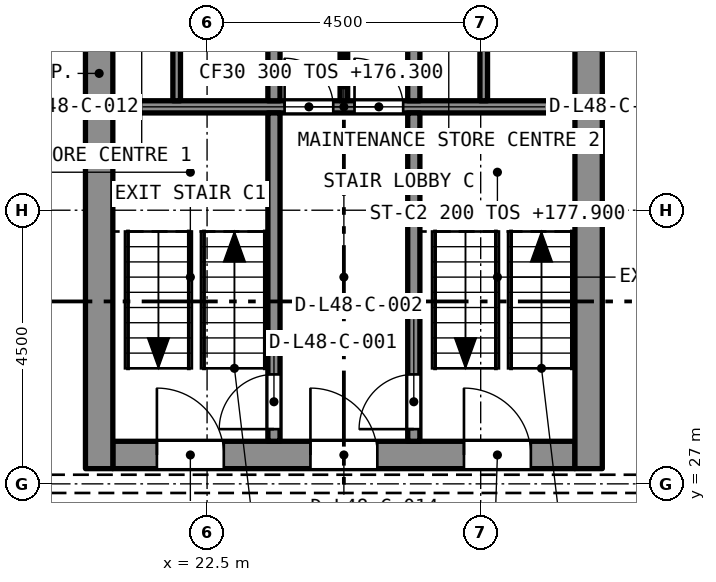
"""IFC4 building model, lengths in metres.
Left out: names, types, materials, properties, quantities, classifications, styles, units other than length and angle.
Written with IfcOpenShell. Run it as: python <this file> out.ifc"""

import sys

from ifc_helpers import new_model, si_unit, direction, frame, frame_2d, origin, place, context, subcontext, project, spatial, rectangle, extrude, element, fill, save


model = new_model("IFC4")
c1 = context("Model", 3, precision=1e-05, world=origin(), true_north=direction((0.0, 1.0)))
c2 = subcontext(c1, "Body", "Model", "MODEL_VIEW")
j1 = project(units=[si_unit("LENGTHUNIT", "METRE"), si_unit("PLANEANGLEUNIT", "RADIAN")], contexts=[c1])
p1 = place(None, origin())
s1 = spatial("IfcSite", under=j1, at=p1, CompositionType="ELEMENT")
p2 = place(p1, origin())
s2 = spatial("IfcBuilding", under=s1, at=p2, CompositionType="ELEMENT")
p3 = place(p2, frame((0.0, 0.0, 176.3)))
s3 = spatial("IfcBuildingStorey", under=s2, at=p3, CompositionType="ELEMENT", Elevation=176.3)
p4 = place(p3, frame((20.95, 27.475, 0.0), z_axis=(0.0, 0.0, 1.0), x_axis=(1.0, 0.0, 0.0)))
e1 = element("IfcWall", 1, at=p4, inside=s3, PredefinedType="SOLIDWALL", context=c2, shape_type="SweptSolid", body=[
    extrude(rectangle(XDim=7.6, YDim=0.45, at=frame_2d((3.8, 0.0))), origin(), (0.0, 0.0, 1.0), 3.2),
])
p5 = place(p4, frame((0.725, 0.0, 0.0)))
e2 = element("IfcOpeningElement", 2, at=p5, cuts=e1, PredefinedType="OPENING", context=c2, shape_type="SweptSolid", body=[
    extrude(rectangle(XDim=1.1, YDim=2.1, at=frame_2d((0.55, 1.05))), frame((0.0, 0.235, 0.0), z_axis=(0.0, -1.0, 0.0), x_axis=(1.0, 0.0, 0.0)), (0.0, 0.0, 1.0), 0.47),
])
p6 = place(p4, frame((3.25, 0.0, 0.0)))
e3 = element("IfcOpeningElement", 3, at=p6, cuts=e1, PredefinedType="OPENING", context=c2, shape_type="SweptSolid", body=[
    extrude(rectangle(XDim=1.1, YDim=2.1, at=frame_2d((0.55, 1.05))), frame((0.0, 0.235, 0.0), z_axis=(0.0, -1.0, 0.0), x_axis=(1.0, 0.0, 0.0)), (0.0, 0.0, 1.0), 0.47),
])
p7 = place(p4, frame((5.775, 0.0, 0.0)))
e4 = element("IfcOpeningElement", 4, at=p7, cuts=e1, PredefinedType="OPENING", context=c2, shape_type="SweptSolid", body=[
    extrude(rectangle(XDim=1.1, YDim=2.1, at=frame_2d((0.55, 1.05))), frame((0.0, 0.235, 0.0), z_axis=(0.0, -1.0, 0.0), x_axis=(1.0, 0.0, 0.0)), (0.0, 0.0, 1.0), 0.47),
])
p8 = place(p3, frame((20.725, 27.25, 0.0), z_axis=(0.0, 0.0, 1.0), x_axis=(0.0, 1.0, 0.0)))
e5 = element("IfcWall", 5, at=p8, inside=s3, PredefinedType="SOLIDWALL", context=c2, shape_type="SweptSolid", body=[
    extrude(rectangle(XDim=13.0, YDim=0.45, at=frame_2d((6.5, 0.0))), origin(), (0.0, 0.0, 1.0), 3.2),
])
p9 = place(p8, frame((8.7, 0.0, 0.0)))
e6 = element("IfcOpeningElement", 6, at=p9, cuts=e5, PredefinedType="OPENING", context=c2, shape_type="SweptSolid", body=[
    extrude(rectangle(XDim=1.2, YDim=2.1, at=frame_2d((0.6, 1.05))), frame((0.0, 0.235, 0.0), z_axis=(0.0, -1.0, 0.0), x_axis=(1.0, 0.0, 0.0)), (0.0, 0.0, 1.0), 0.47),
])
p10 = place(p3, frame((28.775, 27.25, 0.0), z_axis=(0.0, 0.0, 1.0), x_axis=(0.0, 1.0, 0.0)))
e7 = element("IfcWall", 7, at=p10, inside=s3, PredefinedType="SOLIDWALL", context=c2, shape_type="SweptSolid", body=[
    extrude(rectangle(XDim=13.0, YDim=0.45, at=frame_2d((6.5, 0.0))), origin(), (0.0, 0.0, 1.0), 3.2),
])
p11 = place(p10, frame((8.7, 0.0, 0.0)))
e8 = element("IfcOpeningElement", 8, at=p11, cuts=e7, PredefinedType="OPENING", context=c2, shape_type="SweptSolid", body=[
    extrude(rectangle(XDim=1.2, YDim=2.1, at=frame_2d((0.6, 1.05))), frame((0.0, 0.235, 0.0), z_axis=(0.0, -1.0, 0.0), x_axis=(1.0, 0.0, 0.0)), (0.0, 0.0, 1.0), 0.47),
])
p12 = place(p3, frame((20.95, 33.2, 0.0), z_axis=(0.0, 0.0, 1.0), x_axis=(1.0, 0.0, 0.0)))
e9 = element("IfcWall", 9, at=p12, inside=s3, PredefinedType="SOLIDWALL", context=c2, shape_type="SweptSolid", body=[
    extrude(rectangle(XDim=7.6, YDim=0.2, at=frame_2d((3.8, 0.0))), origin(), (0.0, 0.0, 1.0), 2.9),
])
p13 = place(p12, frame((2.825, 0.0, 0.0)))
e10 = element("IfcOpeningElement", 10, at=p13, cuts=e9, PredefinedType="OPENING", context=c2, shape_type="SweptSolid", body=[
    extrude(rectangle(XDim=0.8, YDim=2.1, at=frame_2d((0.4, 1.05))), frame((0.0, 0.11, 0.0), z_axis=(0.0, -1.0, 0.0), x_axis=(1.0, 0.0, 0.0)), (0.0, 0.0, 1.0), 0.22),
])
p14 = place(p12, frame((3.975, 0.0, 0.0)))
e11 = element("IfcOpeningElement", 11, at=p14, cuts=e9, PredefinedType="OPENING", context=c2, shape_type="SweptSolid", body=[
    extrude(rectangle(XDim=0.8, YDim=2.1, at=frame_2d((0.4, 1.05))), frame((0.0, 0.11, 0.0), z_axis=(0.0, -1.0, 0.0), x_axis=(1.0, 0.0, 0.0)), (0.0, 0.0, 1.0), 0.22),
])
p15 = place(p3, frame((23.6, 27.7, 0.0), z_axis=(0.0, 0.0, 1.0), x_axis=(0.0, 1.0, 0.0)))
e12 = element("IfcWall", 12, at=p15, inside=s3, PredefinedType="SOLIDWALL", context=c2, shape_type="SweptSolid", body=[
    extrude(rectangle(XDim=5.4, YDim=0.2, at=frame_2d((2.7, 0.0))), origin(), (0.0, 0.0, 1.0), 2.9),
])
p16 = place(p15, frame((0.2, 0.0, 0.0)))
e13 = element("IfcOpeningElement", 13, at=p16, cuts=e12, PredefinedType="OPENING", context=c2, shape_type="SweptSolid", body=[
    extrude(rectangle(XDim=0.9, YDim=2.1, at=frame_2d((0.45, 1.05))), frame((0.0, 0.11, 0.0), z_axis=(0.0, -1.0, 0.0), x_axis=(1.0, 0.0, 0.0)), (0.0, 0.0, 1.0), 0.22),
])
p17 = place(p3, frame((25.9, 27.7, 0.0), z_axis=(0.0, 0.0, 1.0), x_axis=(0.0, 1.0, 0.0)))
e14 = element("IfcWall", 14, at=p17, inside=s3, PredefinedType="SOLIDWALL", context=c2, shape_type="SweptSolid", body=[
    extrude(rectangle(XDim=5.4, YDim=0.2, at=frame_2d((2.7, 0.0))), origin(), (0.0, 0.0, 1.0), 2.9),
])
p18 = place(p17, frame((0.2, 0.0, 0.0)))
e15 = element("IfcOpeningElement", 15, at=p18, cuts=e14, PredefinedType="OPENING", context=c2, shape_type="SweptSolid", body=[
    extrude(rectangle(XDim=0.9, YDim=2.1, at=frame_2d((0.45, 1.05))), frame((0.0, 0.11, 0.0), z_axis=(0.0, -1.0, 0.0), x_axis=(1.0, 0.0, 0.0)), (0.0, 0.0, 1.0), 0.22),
])
for number, where, z_axis, x_axis in (
    (16, (23.6, 33.3, 0.0), (0.0, 0.0, 1.0), (0.0, 1.0, 0.0)),
    (17, (25.9, 33.3, 0.0), (0.0, 0.0, 1.0), (0.0, 1.0, 0.0)),
):
    element("IfcWall", number, at=place(p3, frame(where, z_axis=z_axis, x_axis=x_axis)), inside=s3, PredefinedType="SOLIDWALL", context=c2, shape_type="SweptSolid", body=[
        extrude(rectangle(XDim=2.3, YDim=0.2, at=frame_2d((1.15, 0.0))), origin(), (0.0, 0.0, 1.0), 2.9),
    ])
for number, where, z_axis, x_axis in (
    (18, (22.0, 33.3, 0.0), (0.0, 0.0, 1.0), (0.0, 1.0, 0.0)),
    (19, (27.05, 33.3, 0.0), (0.0, 0.0, 1.0), (0.0, 1.0, 0.0)),
    (20, (24.75, 33.3, 0.0), (0.0, 0.0, 1.0), (0.0, 1.0, 0.0)),
):
    element("IfcWall", number, at=place(p3, frame(where, z_axis=z_axis, x_axis=x_axis)), inside=s3, PredefinedType="PARTITIONING", context=c2, shape_type="SweptSolid", body=[
        extrude(rectangle(XDim=2.3, YDim=0.125, at=frame_2d((1.15, 0.0))), origin(), (0.0, 0.0, 1.0), 2.9),
    ])
p19 = place(p16, origin())
e21 = element("IfcDoor", 21, at=p19, inside=s3, OperationType="SINGLE_SWING_LEFT", PredefinedType="DOOR", context=c2, shape_type="SweptSolid", body=[
    extrude(rectangle(XDim=0.9, YDim=2.1, at=frame_2d((0.45, 1.05))), frame((0.0, 0.025, 0.0), z_axis=(0.0, -1.0, 0.0), x_axis=(1.0, 0.0, 0.0)), (0.0, 0.0, 1.0), 0.05),
])
fill(e13, e21)
p20 = place(p18, origin())
e22 = element("IfcDoor", 22, at=p20, inside=s3, OperationType="SINGLE_SWING_LEFT", PredefinedType="DOOR", context=c2, shape_type="SweptSolid", body=[
    extrude(rectangle(XDim=0.9, YDim=2.1, at=frame_2d((0.45, 1.05))), frame((0.0, 0.025, 0.0), z_axis=(0.0, -1.0, 0.0), x_axis=(1.0, 0.0, 0.0)), (0.0, 0.0, 1.0), 0.05),
])
fill(e15, e22)
p21 = place(p13, origin())
e23 = element("IfcDoor", 23, at=p21, inside=s3, OperationType="SINGLE_SWING_LEFT", PredefinedType="DOOR", context=c2, shape_type="SweptSolid", body=[
    extrude(rectangle(XDim=0.8, YDim=2.1, at=frame_2d((0.4, 1.05))), frame((0.0, 0.025, 0.0), z_axis=(0.0, -1.0, 0.0), x_axis=(1.0, 0.0, 0.0)), (0.0, 0.0, 1.0), 0.05),
])
fill(e10, e23)
p22 = place(p14, origin())
e24 = element("IfcDoor", 24, at=p22, inside=s3, OperationType="SINGLE_SWING_LEFT", PredefinedType="DOOR", context=c2, shape_type="SweptSolid", body=[
    extrude(rectangle(XDim=0.8, YDim=2.1, at=frame_2d((0.4, 1.05))), frame((0.0, 0.025, 0.0), z_axis=(0.0, -1.0, 0.0), x_axis=(1.0, 0.0, 0.0)), (0.0, 0.0, 1.0), 0.05),
])
fill(e11, e24)
p23 = place(p5, origin())
e25 = element("IfcDoor", 25, at=p23, inside=s3, OperationType="SINGLE_SWING_LEFT", PredefinedType="DOOR", context=c2, shape_type="SweptSolid", body=[
    extrude(rectangle(XDim=1.1, YDim=2.1, at=frame_2d((0.55, 1.05))), frame((0.0, 0.025, 0.0), z_axis=(0.0, -1.0, 0.0), x_axis=(1.0, 0.0, 0.0)), (0.0, 0.0, 1.0), 0.05),
])
fill(e2, e25)
p24 = place(p6, origin())
e26 = element("IfcDoor", 26, at=p24, inside=s3, OperationType="SINGLE_SWING_LEFT", PredefinedType="DOOR", context=c2, shape_type="SweptSolid", body=[
    extrude(rectangle(XDim=1.1, YDim=2.1, at=frame_2d((0.55, 1.05))), frame((0.0, 0.025, 0.0), z_axis=(0.0, -1.0, 0.0), x_axis=(1.0, 0.0, 0.0)), (0.0, 0.0, 1.0), 0.05),
])
fill(e3, e26)
p25 = place(p7, origin())
e27 = element("IfcDoor", 27, at=p25, inside=s3, OperationType="SINGLE_SWING_LEFT", PredefinedType="DOOR", context=c2, shape_type="SweptSolid", body=[
    extrude(rectangle(XDim=1.1, YDim=2.1, at=frame_2d((0.55, 1.05))), frame((0.0, 0.025, 0.0), z_axis=(0.0, -1.0, 0.0), x_axis=(1.0, 0.0, 0.0)), (0.0, 0.0, 1.0), 0.05),
])
fill(e4, e27)
save(model, sys.argv[1])
